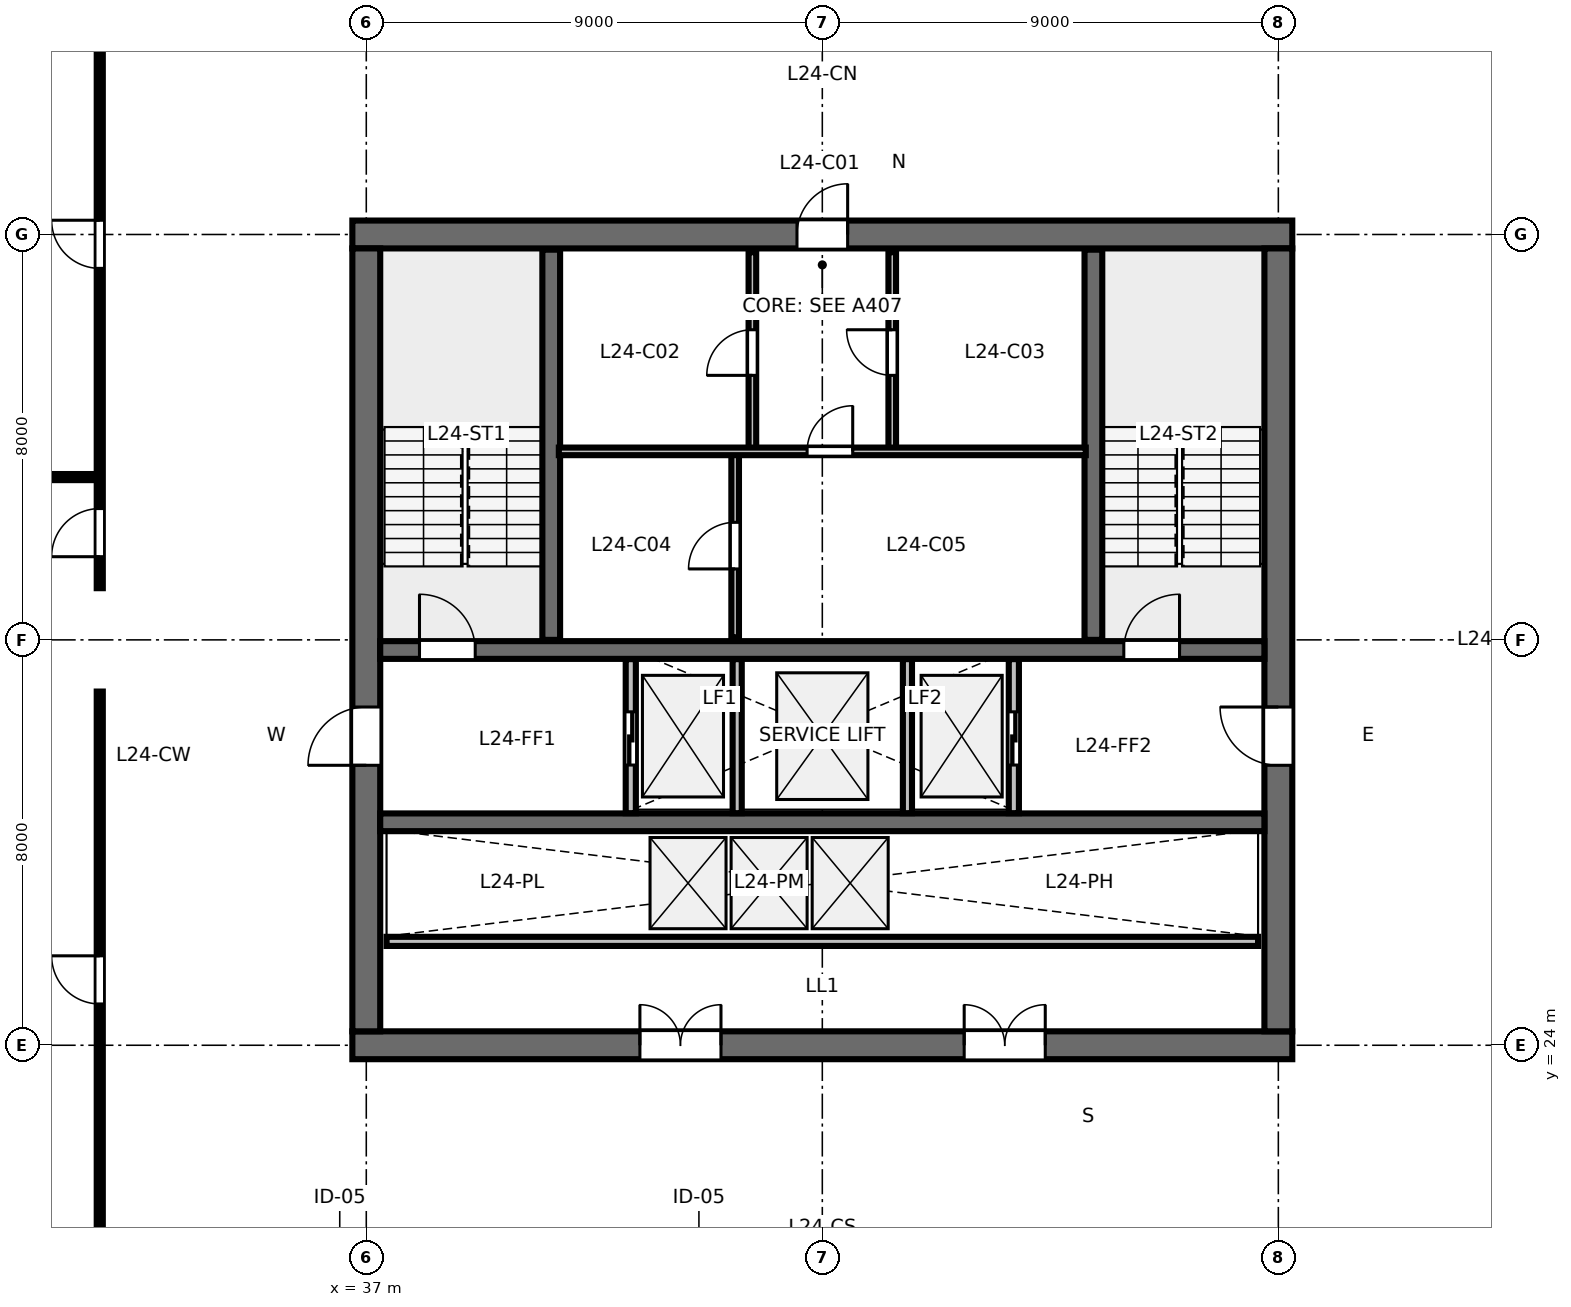
"""IFC4 building model, lengths in metres.
Left out: names, types, materials, properties, quantities, classifications, styles, units other than length and angle.
Written with IfcOpenShell. Run it as: python <this file> out.ifc"""

import sys

from ifc_helpers import new_model, si_unit, direction, frame, frame_2d, origin, place, context, subcontext, project, spatial, rectangle, extrude, element, fill, save


model = new_model("IFC4")
c1 = context("Model", 3, precision=1e-05, world=origin(), true_north=direction((0.0, 1.0)))
c2 = subcontext(c1, "Body", "Model", "MODEL_VIEW")
j1 = project(units=[si_unit("LENGTHUNIT", "METRE"), si_unit("PLANEANGLEUNIT", "RADIAN")], contexts=[c1])
p1 = place(None, origin())
s1 = spatial("IfcSite", under=j1, at=p1, CompositionType="ELEMENT")
p2 = place(p1, origin())
s2 = spatial("IfcBuilding", under=s1, at=p2, CompositionType="ELEMENT")
p3 = place(p2, frame((0.0, 0.0, 95.2)))
s3 = spatial("IfcBuildingStorey", under=s2, at=p3, CompositionType="ELEMENT", Elevation=95.2)
p4 = place(p3, frame((36.725, 24.0, 0.0), z_axis=(0.0, 0.0, 1.0), x_axis=(1.0, 0.0, 0.0)))
e1 = element("IfcWall", 1, at=p4, inside=s3, PredefinedType="SHEAR", context=c2, shape_type="SweptSolid", body=[
    extrude(rectangle(XDim=18.55, YDim=0.55, at=frame_2d((9.275, 0.0))), origin(), (0.0, 0.0, 1.0), 3.36),
])
p5 = place(p4, frame((5.675, 0.0, 0.0)))
e2 = element("IfcOpeningElement", 2, at=p5, cuts=e1, PredefinedType="OPENING", context=c2, shape_type="SweptSolid", body=[
    extrude(rectangle(XDim=1.6, YDim=2.15, at=frame_2d((0.8, 1.075))), frame((0.0, 0.285, 0.0), z_axis=(0.0, -1.0, 0.0), x_axis=(1.0, 0.0, 0.0)), (0.0, 0.0, 1.0), 0.57),
])
p6 = place(p4, frame((12.075, 0.0, 0.0)))
e3 = element("IfcOpeningElement", 3, at=p6, cuts=e1, PredefinedType="OPENING", context=c2, shape_type="SweptSolid", body=[
    extrude(rectangle(XDim=1.6, YDim=2.15, at=frame_2d((0.8, 1.075))), frame((0.0, 0.285, 0.0), z_axis=(0.0, -1.0, 0.0), x_axis=(1.0, 0.0, 0.0)), (0.0, 0.0, 1.0), 0.57),
])
p7 = place(p3, frame((36.725, 40.0, 0.0), z_axis=(0.0, 0.0, 1.0), x_axis=(1.0, 0.0, 0.0)))
e4 = element("IfcWall", 4, at=p7, inside=s3, PredefinedType="SHEAR", context=c2, shape_type="SweptSolid", body=[
    extrude(rectangle(XDim=18.55, YDim=0.55, at=frame_2d((9.275, 0.0))), origin(), (0.0, 0.0, 1.0), 3.36),
])
p8 = place(p7, frame((8.775, 0.0, 0.0)))
e5 = element("IfcOpeningElement", 5, at=p8, cuts=e4, PredefinedType="OPENING", context=c2, shape_type="SweptSolid", body=[
    extrude(rectangle(XDim=1.0, YDim=2.15, at=frame_2d((0.5, 1.075))), frame((0.0, 0.285, 0.0), z_axis=(0.0, -1.0, 0.0), x_axis=(1.0, 0.0, 0.0)), (0.0, 0.0, 1.0), 0.57),
])
p9 = place(p3, frame((37.0, 24.275, 0.0), z_axis=(0.0, 0.0, 1.0), x_axis=(0.0, 1.0, 0.0)))
e6 = element("IfcWall", 6, at=p9, inside=s3, PredefinedType="SHEAR", context=c2, shape_type="SweptSolid", body=[
    extrude(rectangle(XDim=15.45, YDim=0.55, at=frame_2d((7.725, 0.0))), origin(), (0.0, 0.0, 1.0), 3.36),
])
p10 = place(p9, frame((5.25, 0.0, 0.0)))
e7 = element("IfcOpeningElement", 7, at=p10, cuts=e6, PredefinedType="OPENING", context=c2, shape_type="SweptSolid", body=[
    extrude(rectangle(XDim=1.15, YDim=2.15, at=frame_2d((0.575, 1.075))), frame((0.0, 0.285, 0.0), z_axis=(0.0, -1.0, 0.0), x_axis=(1.0, 0.0, 0.0)), (0.0, 0.0, 1.0), 0.57),
])
p11 = place(p3, frame((55.0, 24.275, 0.0), z_axis=(0.0, 0.0, 1.0), x_axis=(0.0, 1.0, 0.0)))
e8 = element("IfcWall", 8, at=p11, inside=s3, PredefinedType="SHEAR", context=c2, shape_type="SweptSolid", body=[
    extrude(rectangle(XDim=15.45, YDim=0.55, at=frame_2d((7.725, 0.0))), origin(), (0.0, 0.0, 1.0), 3.36),
])
p12 = place(p11, frame((5.25, 0.0, 0.0)))
e9 = element("IfcOpeningElement", 9, at=p12, cuts=e8, PredefinedType="OPENING", context=c2, shape_type="SweptSolid", body=[
    extrude(rectangle(XDim=1.15, YDim=2.15, at=frame_2d((0.575, 1.075))), frame((0.0, 0.285, 0.0), z_axis=(0.0, -1.0, 0.0), x_axis=(1.0, 0.0, 0.0)), (0.0, 0.0, 1.0), 0.57),
])
p13 = place(p3, frame((37.275, 31.8, 0.0), z_axis=(0.0, 0.0, 1.0), x_axis=(1.0, 0.0, 0.0)))
e10 = element("IfcWall", 10, at=p13, inside=s3, PredefinedType="SHEAR", context=c2, shape_type="SweptSolid", body=[
    extrude(rectangle(XDim=17.45, YDim=0.35, at=frame_2d((8.725, 0.0))), origin(), (0.0, 0.0, 1.0), 3.36),
])
p14 = place(p13, frame((0.775, 0.0, 0.0)))
e11 = element("IfcOpeningElement", 11, at=p14, cuts=e10, PredefinedType="OPENING", context=c2, shape_type="SweptSolid", body=[
    extrude(rectangle(XDim=1.1, YDim=2.15, at=frame_2d((0.55, 1.075))), frame((0.0, 0.185, 0.0), z_axis=(0.0, -1.0, 0.0), x_axis=(1.0, 0.0, 0.0)), (0.0, 0.0, 1.0), 0.37),
])
p15 = place(p13, frame((14.675, 0.0, 0.0)))
e12 = element("IfcOpeningElement", 12, at=p15, cuts=e10, PredefinedType="OPENING", context=c2, shape_type="SweptSolid", body=[
    extrude(rectangle(XDim=1.1, YDim=2.15, at=frame_2d((0.55, 1.075))), frame((0.0, 0.185, 0.0), z_axis=(0.0, -1.0, 0.0), x_axis=(1.0, 0.0, 0.0)), (0.0, 0.0, 1.0), 0.37),
])
p16 = place(p3, frame((37.275, 28.4, 0.0), z_axis=(0.0, 0.0, 1.0), x_axis=(1.0, 0.0, 0.0)))
e13 = element("IfcWall", 13, at=p16, inside=s3, PredefinedType="SHEAR", context=c2, shape_type="SweptSolid", body=[
    extrude(rectangle(XDim=17.45, YDim=0.35, at=frame_2d((8.725, 0.0))), origin(), (0.0, 0.0, 1.0), 3.36),
])
for number, where, z_axis, x_axis in (
    (14, (40.65, 32.0, 0.0), (0.0, 0.0, 1.0), (0.0, 1.0, 0.0)),
    (15, (51.35, 32.0, 0.0), (0.0, 0.0, 1.0), (0.0, 1.0, 0.0)),
):
    element("IfcWall", number, at=place(p3, frame(where, z_axis=z_axis, x_axis=x_axis)), inside=s3, PredefinedType="SHEAR", context=c2, shape_type="SweptSolid", body=[
        extrude(rectangle(XDim=7.7, YDim=0.35, at=frame_2d((3.85, 0.0))), origin(), (0.0, 0.0, 1.0), 3.6),
    ])
p17 = place(p3, frame((44.62, 35.72, 0.0), z_axis=(0.0, 0.0, 1.0), x_axis=(0.0, 1.0, 0.0)))
e16 = element("IfcWall", 16, at=p17, inside=s3, PredefinedType="PARTITIONING", context=c2, shape_type="SweptSolid", body=[
    extrude(rectangle(XDim=3.93, YDim=0.15, at=frame_2d((1.965, 0.0))), origin(), (0.0, 0.0, 1.0), 3.36),
])
p18 = place(p17, frame((1.5, 0.0, 0.0)))
e17 = element("IfcOpeningElement", 17, at=p18, cuts=e16, PredefinedType="OPENING", context=c2, shape_type="SweptSolid", body=[
    extrude(rectangle(XDim=0.9, YDim=2.15, at=frame_2d((0.45, 1.075))), frame((0.0, 0.085, 0.0), z_axis=(0.0, -1.0, 0.0), x_axis=(1.0, 0.0, 0.0)), (0.0, 0.0, 1.0), 0.17),
])
p19 = place(p3, frame((47.38, 35.72, 0.0), z_axis=(0.0, 0.0, 1.0), x_axis=(0.0, 1.0, 0.0)))
e18 = element("IfcWall", 18, at=p19, inside=s3, PredefinedType="PARTITIONING", context=c2, shape_type="SweptSolid", body=[
    extrude(rectangle(XDim=3.93, YDim=0.15, at=frame_2d((1.965, 0.0))), origin(), (0.0, 0.0, 1.0), 3.36),
])
p20 = place(p19, frame((1.5, 0.0, 0.0)))
e19 = element("IfcOpeningElement", 19, at=p20, cuts=e18, PredefinedType="OPENING", context=c2, shape_type="SweptSolid", body=[
    extrude(rectangle(XDim=0.9, YDim=2.15, at=frame_2d((0.45, 1.075))), frame((0.0, 0.085, 0.0), z_axis=(0.0, -1.0, 0.0), x_axis=(1.0, 0.0, 0.0)), (0.0, 0.0, 1.0), 0.17),
])
p21 = place(p3, frame((44.28, 32.05, 0.0), z_axis=(0.0, 0.0, 1.0), x_axis=(0.0, 1.0, 0.0)))
e20 = element("IfcWall", 20, at=p21, inside=s3, PredefinedType="PARTITIONING", context=c2, shape_type="SweptSolid", body=[
    extrude(rectangle(XDim=3.67, YDim=0.15, at=frame_2d((1.835, 0.0))), origin(), (0.0, 0.0, 1.0), 3.36),
])
p22 = place(p21, frame((1.35, 0.0, 0.0)))
e21 = element("IfcOpeningElement", 21, at=p22, cuts=e20, PredefinedType="OPENING", context=c2, shape_type="SweptSolid", body=[
    extrude(rectangle(XDim=0.92, YDim=2.15, at=frame_2d((0.46, 1.075))), frame((0.0, 0.085, 0.0), z_axis=(0.0, -1.0, 0.0), x_axis=(1.0, 0.0, 0.0)), (0.0, 0.0, 1.0), 0.17),
])
p23 = place(p3, frame((40.8, 35.72, 0.0), z_axis=(0.0, 0.0, 1.0), x_axis=(1.0, 0.0, 0.0)))
e22 = element("IfcWall", 22, at=p23, inside=s3, PredefinedType="PARTITIONING", context=c2, shape_type="SweptSolid", body=[
    extrude(rectangle(XDim=10.4, YDim=0.15, at=frame_2d((5.2, 0.0))), origin(), (0.0, 0.0, 1.0), 3.36),
])
p24 = place(p23, frame((4.9, 0.0, 0.0)))
e23 = element("IfcOpeningElement", 23, at=p24, cuts=e22, PredefinedType="OPENING", context=c2, shape_type="SweptSolid", body=[
    extrude(rectangle(XDim=0.9, YDim=2.15, at=frame_2d((0.45, 1.075))), frame((0.0, 0.085, 0.0), z_axis=(0.0, -1.0, 0.0), x_axis=(1.0, 0.0, 0.0)), (0.0, 0.0, 1.0), 0.17),
])
p25 = place(p3, frame((42.22, 28.58, 0.0), z_axis=(0.0, 0.0, 1.0), x_axis=(0.0, 1.0, 0.0)))
e24 = element("IfcWall", 24, at=p25, inside=s3, PredefinedType="PARTITIONING", context=c2, shape_type="SweptSolid", body=[
    extrude(rectangle(XDim=3.04, YDim=0.2, at=frame_2d((1.52, 0.0))), origin(), (0.0, 0.0, 1.0), 3.36),
])
p26 = place(p25, frame((0.95, 0.0, 0.0)))
e25 = element("IfcOpeningElement", 25, at=p26, cuts=e24, PredefinedType="OPENING", context=c2, shape_type="SweptSolid", body=[
    extrude(rectangle(XDim=1.05, YDim=2.15, at=frame_2d((0.525, 1.075))), frame((0.0, 0.11, 0.0), z_axis=(0.0, -1.0, 0.0), x_axis=(1.0, 0.0, 0.0)), (0.0, 0.0, 1.0), 0.22),
])
p27 = place(p3, frame((49.78, 28.58, 0.0), z_axis=(0.0, 0.0, 1.0), x_axis=(0.0, 1.0, 0.0)))
e26 = element("IfcWall", 26, at=p27, inside=s3, PredefinedType="PARTITIONING", context=c2, shape_type="SweptSolid", body=[
    extrude(rectangle(XDim=3.04, YDim=0.2, at=frame_2d((1.52, 0.0))), origin(), (0.0, 0.0, 1.0), 3.36),
])
p28 = place(p27, frame((0.95, 0.0, 0.0)))
e27 = element("IfcOpeningElement", 27, at=p28, cuts=e26, PredefinedType="OPENING", context=c2, shape_type="SweptSolid", body=[
    extrude(rectangle(XDim=1.05, YDim=2.15, at=frame_2d((0.525, 1.075))), frame((0.0, 0.11, 0.0), z_axis=(0.0, -1.0, 0.0), x_axis=(1.0, 0.0, 0.0)), (0.0, 0.0, 1.0), 0.22),
])
for number, where, z_axis, x_axis in (
    (28, (44.32, 28.58, 0.0), (0.0, 0.0, 1.0), (0.0, 1.0, 0.0)),
    (29, (47.68, 28.58, 0.0), (0.0, 0.0, 1.0), (0.0, 1.0, 0.0)),
):
    element("IfcWall", number, at=place(p3, frame(where, z_axis=z_axis, x_axis=x_axis)), inside=s3, PredefinedType="PARTITIONING", context=c2, shape_type="SweptSolid", body=[
        extrude(rectangle(XDim=3.04, YDim=0.18, at=frame_2d((1.52, 0.0))), origin(), (0.0, 0.0, 1.0), 3.36),
    ])
p29 = place(p3, frame((37.4, 26.05, 0.0), z_axis=(0.0, 0.0, 1.0), x_axis=(1.0, 0.0, 0.0)))
e30 = element("IfcWall", 30, at=p29, inside=s3, PredefinedType="PARTITIONING", context=c2, shape_type="SweptSolid", body=[
    extrude(rectangle(XDim=17.2, YDim=0.18, at=frame_2d((8.6, 0.0))), origin(), (0.0, 0.0, 1.0), 3.36),
])
p30 = place(p3, frame((31.74, 35.213, 0.0), z_axis=(0.0, 0.0, 1.0), x_axis=(-1.0, 0.0, 0.0)))
e31 = element("IfcWall", 31, at=p30, inside=s3, PredefinedType="PARTITIONING", context=c2, shape_type="SweptSolid", body=[
    extrude(rectangle(XDim=9.26, YDim=0.12, at=frame_2d((4.63, 0.0))), origin(), (0.0, 0.0, 1.0), 2.64),
])
p31 = place(p30, frame((1.4, 0.0, 0.0)))
e32 = element("IfcOpeningElement", 32, at=p31, cuts=e31, PredefinedType="OPENING", context=c2, shape_type="SweptSolid", body=[
    extrude(rectangle(XDim=0.9, YDim=2.15, at=frame_2d((0.45, 1.075))), frame((0.0, 0.07, 0.0), z_axis=(0.0, -1.0, 0.0), x_axis=(1.0, 0.0, 0.0)), (0.0, 0.0, 1.0), 0.14),
])
p32 = place(p3, frame((31.74, 19.4, 0.0), z_axis=(0.0, 0.0, 1.0), x_axis=(0.0, 1.0, 0.0)))
e33 = element("IfcWall", 33, at=p32, inside=s3, PredefinedType="PARTITIONING", context=c2, shape_type="SweptSolid", body=[
    extrude(rectangle(XDim=11.58, YDim=0.12, at=frame_2d((5.79, 0.0))), origin(), (0.0, 0.0, 1.0), 2.64),
])
p33 = place(p32, frame((5.415, 0.0, 0.0)))
e34 = element("IfcOpeningElement", 34, at=p33, cuts=e33, PredefinedType="OPENING", context=c2, shape_type="SweptSolid", body=[
    extrude(rectangle(XDim=0.95, YDim=2.15, at=frame_2d((0.475, 1.075))), frame((0.0, 0.07, 0.0), z_axis=(0.0, -1.0, 0.0), x_axis=(1.0, 0.0, 0.0)), (0.0, 0.0, 1.0), 0.14),
])
p34 = place(p3, frame((31.74, 33.02, 0.0), z_axis=(0.0, 0.0, 1.0), x_axis=(0.0, 1.0, 0.0)))
e35 = element("IfcWall", 35, at=p34, inside=s3, PredefinedType="PARTITIONING", context=c2, shape_type="SweptSolid", body=[
    extrude(rectangle(XDim=11.58, YDim=0.12, at=frame_2d((5.79, 0.0))), origin(), (0.0, 0.0, 1.0), 2.64),
])
p35 = place(p34, frame((0.621, 0.0, 0.0)))
e36 = element("IfcOpeningElement", 36, at=p35, cuts=e35, PredefinedType="OPENING", context=c2, shape_type="SweptSolid", body=[
    extrude(rectangle(XDim=0.95, YDim=2.15, at=frame_2d((0.475, 1.075))), frame((0.0, 0.07, 0.0), z_axis=(0.0, -1.0, 0.0), x_axis=(1.0, 0.0, 0.0)), (0.0, 0.0, 1.0), 0.14),
])
p36 = place(p34, frame((6.311, 0.0, 0.0)))
e37 = element("IfcOpeningElement", 37, at=p36, cuts=e35, PredefinedType="OPENING", context=c2, shape_type="SweptSolid", body=[
    extrude(rectangle(XDim=0.95, YDim=2.15, at=frame_2d((0.475, 1.075))), frame((0.0, 0.07, 0.0), z_axis=(0.0, -1.0, 0.0), x_axis=(1.0, 0.0, 0.0)), (0.0, 0.0, 1.0), 0.14),
])
p37 = place(p14, origin())
e38 = element("IfcDoor", 38, at=p37, inside=s3, OperationType="SINGLE_SWING_LEFT", PredefinedType="DOOR", context=c2, shape_type="SweptSolid", body=[
    extrude(rectangle(XDim=1.1, YDim=2.15, at=frame_2d((0.55, 1.075))), frame((0.0, 0.025, 0.0), z_axis=(0.0, -1.0, 0.0), x_axis=(1.0, 0.0, 0.0)), (0.0, 0.0, 1.0), 0.05),
])
fill(e11, e38)
p38 = place(p15, origin())
e39 = element("IfcDoor", 39, at=p38, inside=s3, OperationType="SINGLE_SWING_RIGHT", PredefinedType="DOOR", context=c2, shape_type="SweptSolid", body=[
    extrude(rectangle(XDim=1.1, YDim=2.15, at=frame_2d((0.55, 1.075))), frame((0.0, 0.025, 0.0), z_axis=(0.0, -1.0, 0.0), x_axis=(1.0, 0.0, 0.0)), (0.0, 0.0, 1.0), 0.05),
])
fill(e12, e39)
p39 = place(p8, origin())
e40 = element("IfcDoor", 40, at=p39, inside=s3, OperationType="SINGLE_SWING_RIGHT", PredefinedType="DOOR", context=c2, shape_type="SweptSolid", body=[
    extrude(rectangle(XDim=1.0, YDim=2.15, at=frame_2d((0.5, 1.075))), frame((0.0, 0.025, 0.0), z_axis=(0.0, -1.0, 0.0), x_axis=(1.0, 0.0, 0.0)), (0.0, 0.0, 1.0), 0.05),
])
fill(e5, e40)
p40 = place(p10, origin())
e41 = element("IfcDoor", 41, at=p40, inside=s3, OperationType="SINGLE_SWING_LEFT", PredefinedType="DOOR", context=c2, shape_type="SweptSolid", body=[
    extrude(rectangle(XDim=1.15, YDim=2.15, at=frame_2d((0.575, 1.075))), frame((0.0, 0.025, 0.0), z_axis=(0.0, -1.0, 0.0), x_axis=(1.0, 0.0, 0.0)), (0.0, 0.0, 1.0), 0.05),
])
fill(e7, e41)
p41 = place(p12, origin())
e42 = element("IfcDoor", 42, at=p41, inside=s3, OperationType="SINGLE_SWING_RIGHT", PredefinedType="DOOR", context=c2, shape_type="SweptSolid", body=[
    extrude(rectangle(XDim=1.15, YDim=2.15, at=frame_2d((0.575, 1.075))), frame((0.0, 0.025, 0.0), z_axis=(0.0, -1.0, 0.0), x_axis=(1.0, 0.0, 0.0)), (0.0, 0.0, 1.0), 0.05),
])
fill(e9, e42)
p42 = place(p5, origin())
e43 = element("IfcDoor", 43, at=p42, inside=s3, OperationType="DOUBLE_DOOR_SINGLE_SWING", PredefinedType="DOOR", context=c2, shape_type="SweptSolid", body=[
    extrude(rectangle(XDim=1.6, YDim=2.15, at=frame_2d((0.8, 1.075))), frame((0.0, 0.025, 0.0), z_axis=(0.0, -1.0, 0.0), x_axis=(1.0, 0.0, 0.0)), (0.0, 0.0, 1.0), 0.05),
])
fill(e2, e43)
p43 = place(p6, origin())
e44 = element("IfcDoor", 44, at=p43, inside=s3, OperationType="DOUBLE_DOOR_SINGLE_SWING", PredefinedType="DOOR", context=c2, shape_type="SweptSolid", body=[
    extrude(rectangle(XDim=1.6, YDim=2.15, at=frame_2d((0.8, 1.075))), frame((0.0, 0.025, 0.0), z_axis=(0.0, -1.0, 0.0), x_axis=(1.0, 0.0, 0.0)), (0.0, 0.0, 1.0), 0.05),
])
fill(e3, e44)
p44 = place(p18, origin())
e45 = element("IfcDoor", 45, at=p44, inside=s3, OperationType="SINGLE_SWING_LEFT", PredefinedType="DOOR", context=c2, shape_type="SweptSolid", body=[
    extrude(rectangle(XDim=0.9, YDim=2.15, at=frame_2d((0.45, 1.075))), frame((0.0, 0.025, 0.0), z_axis=(0.0, -1.0, 0.0), x_axis=(1.0, 0.0, 0.0)), (0.0, 0.0, 1.0), 0.05),
])
fill(e17, e45)
p45 = place(p20, origin())
e46 = element("IfcDoor", 46, at=p45, inside=s3, OperationType="SINGLE_SWING_RIGHT", PredefinedType="DOOR", context=c2, shape_type="SweptSolid", body=[
    extrude(rectangle(XDim=0.9, YDim=2.15, at=frame_2d((0.45, 1.075))), frame((0.0, 0.025, 0.0), z_axis=(0.0, -1.0, 0.0), x_axis=(1.0, 0.0, 0.0)), (0.0, 0.0, 1.0), 0.05),
])
fill(e19, e46)
p46 = place(p22, origin())
e47 = element("IfcDoor", 47, at=p46, inside=s3, OperationType="SINGLE_SWING_LEFT", PredefinedType="DOOR", context=c2, shape_type="SweptSolid", body=[
    extrude(rectangle(XDim=0.92, YDim=2.15, at=frame_2d((0.46, 1.075))), frame((0.0, 0.025, 0.0), z_axis=(0.0, -1.0, 0.0), x_axis=(1.0, 0.0, 0.0)), (0.0, 0.0, 1.0), 0.05),
])
fill(e21, e47)
p47 = place(p24, origin())
e48 = element("IfcDoor", 48, at=p47, inside=s3, OperationType="SINGLE_SWING_RIGHT", PredefinedType="DOOR", context=c2, shape_type="SweptSolid", body=[
    extrude(rectangle(XDim=0.9, YDim=2.15, at=frame_2d((0.45, 1.075))), frame((0.0, 0.025, 0.0), z_axis=(0.0, -1.0, 0.0), x_axis=(1.0, 0.0, 0.0)), (0.0, 0.0, 1.0), 0.05),
])
fill(e23, e48)
p48 = place(p26, origin())
e49 = element("IfcDoor", 49, at=p48, inside=s3, OperationType="SLIDING_TO_LEFT", PredefinedType="DOOR", context=c2, shape_type="SweptSolid", body=[
    extrude(rectangle(XDim=1.05, YDim=2.15, at=frame_2d((0.525, 1.075))), frame((0.0, 0.025, 0.0), z_axis=(0.0, -1.0, 0.0), x_axis=(1.0, 0.0, 0.0)), (0.0, 0.0, 1.0), 0.05),
])
fill(e25, e49)
p49 = place(p28, origin())
e50 = element("IfcDoor", 50, at=p49, inside=s3, OperationType="SLIDING_TO_RIGHT", PredefinedType="DOOR", context=c2, shape_type="SweptSolid", body=[
    extrude(rectangle(XDim=1.05, YDim=2.15, at=frame_2d((0.525, 1.075))), frame((0.0, 0.025, 0.0), z_axis=(0.0, -1.0, 0.0), x_axis=(1.0, 0.0, 0.0)), (0.0, 0.0, 1.0), 0.05),
])
fill(e27, e50)
p50 = place(p33, origin())
e51 = element("IfcDoor", 51, at=p50, inside=s3, OperationType="SINGLE_SWING_RIGHT", PredefinedType="DOOR", context=c2, shape_type="SweptSolid", body=[
    extrude(rectangle(XDim=0.95, YDim=2.15, at=frame_2d((0.475, 1.075))), frame((0.0, 0.025, 0.0), z_axis=(0.0, -1.0, 0.0), x_axis=(1.0, 0.0, 0.0)), (0.0, 0.0, 1.0), 0.05),
])
fill(e34, e51)
p51 = place(p35, origin())
e52 = element("IfcDoor", 52, at=p51, inside=s3, OperationType="SINGLE_SWING_LEFT", PredefinedType="DOOR", context=c2, shape_type="SweptSolid", body=[
    extrude(rectangle(XDim=0.95, YDim=2.15, at=frame_2d((0.475, 1.075))), frame((0.0, 0.025, 0.0), z_axis=(0.0, -1.0, 0.0), x_axis=(1.0, 0.0, 0.0)), (0.0, 0.0, 1.0), 0.05),
])
fill(e36, e52)
p52 = place(p36, origin())
e53 = element("IfcDoor", 53, at=p52, inside=s3, OperationType="SINGLE_SWING_RIGHT", PredefinedType="DOOR", context=c2, shape_type="SweptSolid", body=[
    extrude(rectangle(XDim=0.95, YDim=2.15, at=frame_2d((0.475, 1.075))), frame((0.0, 0.025, 0.0), z_axis=(0.0, -1.0, 0.0), x_axis=(1.0, 0.0, 0.0)), (0.0, 0.0, 1.0), 0.05),
])
fill(e37, e53)
save(model, sys.argv[1])
